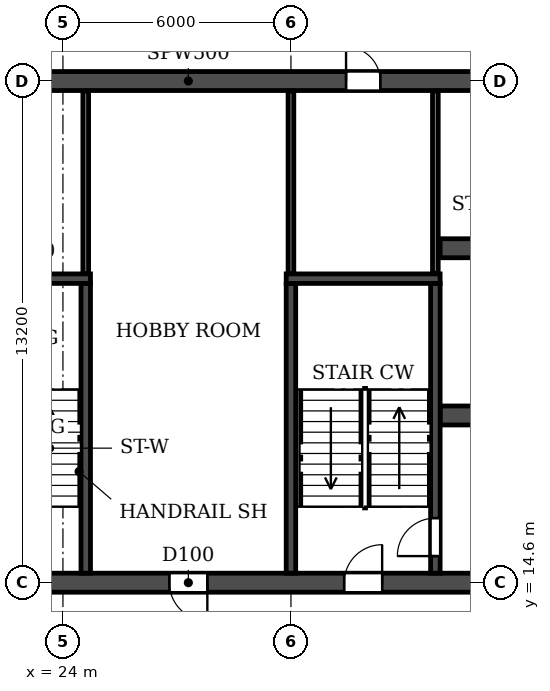
"""IFC4 building model, lengths in metres.
Left out: names, types, materials, properties, quantities, classifications, styles, units other than length and angle.
Written with IfcOpenShell. Run it as: python <this file> out.ifc"""

import sys

from ifc_helpers import new_model, si_unit, direction, frame, frame_2d, origin, place, context, subcontext, project, spatial, rectangle, extrude, element, fill, save


model = new_model("IFC4")
c1 = context("Model", 3, precision=1e-05, world=origin(), true_north=direction((0.0, 1.0)))
c2 = subcontext(c1, "Body", "Model", "MODEL_VIEW")
j1 = project(units=[si_unit("LENGTHUNIT", "METRE"), si_unit("PLANEANGLEUNIT", "RADIAN")], contexts=[c1])
p1 = place(None, origin())
s1 = spatial("IfcSite", under=j1, at=p1, CompositionType="ELEMENT")
p2 = place(p1, origin())
s2 = spatial("IfcBuilding", under=s1, at=p2, CompositionType="ELEMENT")
p3 = place(p2, frame((0.0, 0.0, 102.6)))
s3 = spatial("IfcBuildingStorey", under=s2, at=p3, CompositionType="ELEMENT", Elevation=102.6)
p4 = place(p3, frame((8.6, 14.6, 0.0), z_axis=(0.0, 0.0, 1.0), x_axis=(1.0, 0.0, 0.0)))
e1 = element("IfcWall", 1, at=p4, inside=s3, PredefinedType="SOLIDWALL", context=c2, shape_type="SweptSolid", body=[
    extrude(rectangle(XDim=84.8, YDim=0.5, at=frame_2d((42.4, 0.0))), origin(), (0.0, 0.0, 1.0), 3.0),
])
p5 = place(p4, frame((0.9, 0.0, 0.0)))
e2 = element("IfcOpeningElement", 2, at=p5, cuts=e1, PredefinedType="OPENING", context=c2, shape_type="SweptSolid", body=[
    extrude(rectangle(XDim=1.0, YDim=2.1, at=frame_2d((0.5, 1.05))), frame((0.0, 0.26, 0.0), z_axis=(0.0, -1.0, 0.0), x_axis=(1.0, 0.0, 0.0)), (0.0, 0.0, 1.0), 0.52),
])
p6 = place(p4, frame((5.6, 0.0, 0.0)))
e3 = element("IfcOpeningElement", 3, at=p6, cuts=e1, PredefinedType="OPENING", context=c2, shape_type="SweptSolid", body=[
    extrude(rectangle(XDim=1.0, YDim=2.1, at=frame_2d((0.5, 1.05))), frame((0.0, 0.26, 0.0), z_axis=(0.0, -1.0, 0.0), x_axis=(1.0, 0.0, 0.0)), (0.0, 0.0, 1.0), 0.52),
])
p7 = place(p4, frame((10.3, 0.0, 0.0)))
e4 = element("IfcOpeningElement", 4, at=p7, cuts=e1, PredefinedType="OPENING", context=c2, shape_type="SweptSolid", body=[
    extrude(rectangle(XDim=1.0, YDim=2.1, at=frame_2d((0.5, 1.05))), frame((0.0, 0.26, 0.0), z_axis=(0.0, -1.0, 0.0), x_axis=(1.0, 0.0, 0.0)), (0.0, 0.0, 1.0), 0.52),
])
p8 = place(p4, frame((18.2, 0.0, 0.0)))
e5 = element("IfcOpeningElement", 5, at=p8, cuts=e1, PredefinedType="OPENING", context=c2, shape_type="SweptSolid", body=[
    extrude(rectangle(XDim=1.0, YDim=2.1, at=frame_2d((0.5, 1.05))), frame((0.0, 0.26, 0.0), z_axis=(0.0, -1.0, 0.0), x_axis=(1.0, 0.0, 0.0)), (0.0, 0.0, 1.0), 0.52),
])
p9 = place(p4, frame((22.8, 0.0, 0.0)))
e6 = element("IfcOpeningElement", 6, at=p9, cuts=e1, PredefinedType="OPENING", context=c2, shape_type="SweptSolid", body=[
    extrude(rectangle(XDim=1.0, YDim=2.1, at=frame_2d((0.5, 1.05))), frame((0.0, 0.26, 0.0), z_axis=(0.0, -1.0, 0.0), x_axis=(1.0, 0.0, 0.0)), (0.0, 0.0, 1.0), 0.52),
])
p10 = place(p4, frame((36.7, 0.0, 0.0)))
e7 = element("IfcOpeningElement", 7, at=p10, cuts=e1, PredefinedType="OPENING", context=c2, shape_type="SweptSolid", body=[
    extrude(rectangle(XDim=1.0, YDim=2.1, at=frame_2d((0.5, 1.05))), frame((0.0, 0.26, 0.0), z_axis=(0.0, -1.0, 0.0), x_axis=(1.0, 0.0, 0.0)), (0.0, 0.0, 1.0), 0.52),
])
p11 = place(p4, frame((41.9, 0.0, 0.0)))
e8 = element("IfcOpeningElement", 8, at=p11, cuts=e1, PredefinedType="OPENING", context=c2, shape_type="SweptSolid", body=[
    extrude(rectangle(XDim=1.0, YDim=2.1, at=frame_2d((0.5, 1.05))), frame((0.0, 0.26, 0.0), z_axis=(0.0, -1.0, 0.0), x_axis=(1.0, 0.0, 0.0)), (0.0, 0.0, 1.0), 0.52),
])
p12 = place(p4, frame((47.1, 0.0, 0.0)))
e9 = element("IfcOpeningElement", 9, at=p12, cuts=e1, PredefinedType="OPENING", context=c2, shape_type="SweptSolid", body=[
    extrude(rectangle(XDim=1.0, YDim=2.1, at=frame_2d((0.5, 1.05))), frame((0.0, 0.26, 0.0), z_axis=(0.0, -1.0, 0.0), x_axis=(1.0, 0.0, 0.0)), (0.0, 0.0, 1.0), 0.52),
])
p13 = place(p4, frame((61.0, 0.0, 0.0)))
e10 = element("IfcOpeningElement", 10, at=p13, cuts=e1, PredefinedType="OPENING", context=c2, shape_type="SweptSolid", body=[
    extrude(rectangle(XDim=1.0, YDim=2.1, at=frame_2d((0.5, 1.05))), frame((0.0, 0.26, 0.0), z_axis=(0.0, -1.0, 0.0), x_axis=(1.0, 0.0, 0.0)), (0.0, 0.0, 1.0), 0.52),
])
p14 = place(p4, frame((65.6, 0.0, 0.0)))
e11 = element("IfcOpeningElement", 11, at=p14, cuts=e1, PredefinedType="OPENING", context=c2, shape_type="SweptSolid", body=[
    extrude(rectangle(XDim=1.0, YDim=2.1, at=frame_2d((0.5, 1.05))), frame((0.0, 0.26, 0.0), z_axis=(0.0, -1.0, 0.0), x_axis=(1.0, 0.0, 0.0)), (0.0, 0.0, 1.0), 0.52),
])
p15 = place(p4, frame((73.5, 0.0, 0.0)))
e12 = element("IfcOpeningElement", 12, at=p15, cuts=e1, PredefinedType="OPENING", context=c2, shape_type="SweptSolid", body=[
    extrude(rectangle(XDim=1.0, YDim=2.1, at=frame_2d((0.5, 1.05))), frame((0.0, 0.26, 0.0), z_axis=(0.0, -1.0, 0.0), x_axis=(1.0, 0.0, 0.0)), (0.0, 0.0, 1.0), 0.52),
])
p16 = place(p4, frame((79.6, 0.0, 0.0)))
e13 = element("IfcOpeningElement", 13, at=p16, cuts=e1, PredefinedType="OPENING", context=c2, shape_type="SweptSolid", body=[
    extrude(rectangle(XDim=1.0, YDim=2.1, at=frame_2d((0.5, 1.05))), frame((0.0, 0.26, 0.0), z_axis=(0.0, -1.0, 0.0), x_axis=(1.0, 0.0, 0.0)), (0.0, 0.0, 1.0), 0.52),
])
p17 = place(p3, frame((8.6, 27.8, 0.0), z_axis=(0.0, 0.0, 1.0), x_axis=(1.0, 0.0, 0.0)))
e14 = element("IfcWall", 14, at=p17, inside=s3, PredefinedType="SOLIDWALL", context=c2, shape_type="SweptSolid", body=[
    extrude(rectangle(XDim=84.8, YDim=0.5, at=frame_2d((42.4, 0.0))), origin(), (0.0, 0.0, 1.0), 3.0),
])
p18 = place(p17, frame((1.35, 0.0, 0.0)))
e15 = element("IfcOpeningElement", 15, at=p18, cuts=e14, PredefinedType="OPENING", context=c2, shape_type="SweptSolid", body=[
    extrude(rectangle(XDim=1.0, YDim=2.1, at=frame_2d((0.5, 1.05))), frame((0.0, 0.26, 0.0), z_axis=(0.0, -1.0, 0.0), x_axis=(1.0, 0.0, 0.0)), (0.0, 0.0, 1.0), 0.52),
])
p19 = place(p17, frame((6.05, 0.0, 0.0)))
e16 = element("IfcOpeningElement", 16, at=p19, cuts=e14, PredefinedType="OPENING", context=c2, shape_type="SweptSolid", body=[
    extrude(rectangle(XDim=1.0, YDim=2.1, at=frame_2d((0.5, 1.05))), frame((0.0, 0.26, 0.0), z_axis=(0.0, -1.0, 0.0), x_axis=(1.0, 0.0, 0.0)), (0.0, 0.0, 1.0), 0.52),
])
p20 = place(p17, frame((10.3, 0.0, 0.0)))
e17 = element("IfcOpeningElement", 17, at=p20, cuts=e14, PredefinedType="OPENING", context=c2, shape_type="SweptSolid", body=[
    extrude(rectangle(XDim=1.0, YDim=2.1, at=frame_2d((0.5, 1.05))), frame((0.0, 0.26, 0.0), z_axis=(0.0, -1.0, 0.0), x_axis=(1.0, 0.0, 0.0)), (0.0, 0.0, 1.0), 0.52),
])
p21 = place(p17, frame((13.65, 0.0, 0.0)))
e18 = element("IfcOpeningElement", 18, at=p21, cuts=e14, PredefinedType="OPENING", context=c2, shape_type="SweptSolid", body=[
    extrude(rectangle(XDim=0.9, YDim=2.1, at=frame_2d((0.45, 1.05))), frame((0.0, 0.26, 0.0), z_axis=(0.0, -1.0, 0.0), x_axis=(1.0, 0.0, 0.0)), (0.0, 0.0, 1.0), 0.52),
])
p22 = place(p17, frame((22.85, 0.0, 0.0)))
e19 = element("IfcOpeningElement", 19, at=p22, cuts=e14, PredefinedType="OPENING", context=c2, shape_type="SweptSolid", body=[
    extrude(rectangle(XDim=0.9, YDim=2.1, at=frame_2d((0.45, 1.05))), frame((0.0, 0.26, 0.0), z_axis=(0.0, -1.0, 0.0), x_axis=(1.0, 0.0, 0.0)), (0.0, 0.0, 1.0), 0.52),
])
p23 = place(p17, frame((28.6, 0.0, 0.0)))
e20 = element("IfcOpeningElement", 20, at=p23, cuts=e14, PredefinedType="OPENING", context=c2, shape_type="SweptSolid", body=[
    extrude(rectangle(XDim=1.0, YDim=2.1, at=frame_2d((0.5, 1.05))), frame((0.0, 0.26, 0.0), z_axis=(0.0, -1.0, 0.0), x_axis=(1.0, 0.0, 0.0)), (0.0, 0.0, 1.0), 0.52),
])
p24 = place(p17, frame((33.8, 0.0, 0.0)))
e21 = element("IfcOpeningElement", 21, at=p24, cuts=e14, PredefinedType="OPENING", context=c2, shape_type="SweptSolid", body=[
    extrude(rectangle(XDim=1.0, YDim=2.1, at=frame_2d((0.5, 1.05))), frame((0.0, 0.26, 0.0), z_axis=(0.0, -1.0, 0.0), x_axis=(1.0, 0.0, 0.0)), (0.0, 0.0, 1.0), 0.52),
])
p25 = place(p17, frame((39.0, 0.0, 0.0)))
e22 = element("IfcOpeningElement", 22, at=p25, cuts=e14, PredefinedType="OPENING", context=c2, shape_type="SweptSolid", body=[
    extrude(rectangle(XDim=1.0, YDim=2.1, at=frame_2d((0.5, 1.05))), frame((0.0, 0.26, 0.0), z_axis=(0.0, -1.0, 0.0), x_axis=(1.0, 0.0, 0.0)), (0.0, 0.0, 1.0), 0.52),
])
p26 = place(p17, frame((41.9, 0.0, 0.0)))
e23 = element("IfcOpeningElement", 23, at=p26, cuts=e14, PredefinedType="OPENING", context=c2, shape_type="SweptSolid", body=[
    extrude(rectangle(XDim=1.0, YDim=2.1, at=frame_2d((0.5, 1.05))), frame((0.0, 0.26, 0.0), z_axis=(0.0, -1.0, 0.0), x_axis=(1.0, 0.0, 0.0)), (0.0, 0.0, 1.0), 0.52),
])
p27 = place(p17, frame((44.8, 0.0, 0.0)))
e24 = element("IfcOpeningElement", 24, at=p27, cuts=e14, PredefinedType="OPENING", context=c2, shape_type="SweptSolid", body=[
    extrude(rectangle(XDim=1.0, YDim=2.1, at=frame_2d((0.5, 1.05))), frame((0.0, 0.26, 0.0), z_axis=(0.0, -1.0, 0.0), x_axis=(1.0, 0.0, 0.0)), (0.0, 0.0, 1.0), 0.52),
])
p28 = place(p17, frame((48.7, 0.0, 0.0)))
e25 = element("IfcOpeningElement", 25, at=p28, cuts=e14, PredefinedType="OPENING", context=c2, shape_type="SweptSolid", body=[
    extrude(rectangle(XDim=1.0, YDim=2.1, at=frame_2d((0.5, 1.05))), frame((0.0, 0.26, 0.0), z_axis=(0.0, -1.0, 0.0), x_axis=(1.0, 0.0, 0.0)), (0.0, 0.0, 1.0), 0.52),
])
p29 = place(p17, frame((55.2, 0.0, 0.0)))
e26 = element("IfcOpeningElement", 26, at=p29, cuts=e14, PredefinedType="OPENING", context=c2, shape_type="SweptSolid", body=[
    extrude(rectangle(XDim=1.0, YDim=2.1, at=frame_2d((0.5, 1.05))), frame((0.0, 0.26, 0.0), z_axis=(0.0, -1.0, 0.0), x_axis=(1.0, 0.0, 0.0)), (0.0, 0.0, 1.0), 0.52),
])
p30 = place(p17, frame((61.05, 0.0, 0.0)))
e27 = element("IfcOpeningElement", 27, at=p30, cuts=e14, PredefinedType="OPENING", context=c2, shape_type="SweptSolid", body=[
    extrude(rectangle(XDim=0.9, YDim=2.1, at=frame_2d((0.45, 1.05))), frame((0.0, 0.26, 0.0), z_axis=(0.0, -1.0, 0.0), x_axis=(1.0, 0.0, 0.0)), (0.0, 0.0, 1.0), 0.52),
])
p31 = place(p17, frame((70.25, 0.0, 0.0)))
e28 = element("IfcOpeningElement", 28, at=p31, cuts=e14, PredefinedType="OPENING", context=c2, shape_type="SweptSolid", body=[
    extrude(rectangle(XDim=0.9, YDim=2.1, at=frame_2d((0.45, 1.05))), frame((0.0, 0.26, 0.0), z_axis=(0.0, -1.0, 0.0), x_axis=(1.0, 0.0, 0.0)), (0.0, 0.0, 1.0), 0.52),
])
p32 = place(p17, frame((73.5, 0.0, 0.0)))
e29 = element("IfcOpeningElement", 29, at=p32, cuts=e14, PredefinedType="OPENING", context=c2, shape_type="SweptSolid", body=[
    extrude(rectangle(XDim=1.0, YDim=2.1, at=frame_2d((0.5, 1.05))), frame((0.0, 0.26, 0.0), z_axis=(0.0, -1.0, 0.0), x_axis=(1.0, 0.0, 0.0)), (0.0, 0.0, 1.0), 0.52),
])
p33 = place(p17, frame((77.95, 0.0, 0.0)))
e30 = element("IfcOpeningElement", 30, at=p33, cuts=e14, PredefinedType="OPENING", context=c2, shape_type="SweptSolid", body=[
    extrude(rectangle(XDim=1.5, YDim=2.1, at=frame_2d((0.75, 1.05))), frame((0.0, 0.26, 0.0), z_axis=(0.0, -1.0, 0.0), x_axis=(1.0, 0.0, 0.0)), (0.0, 0.0, 1.0), 0.52),
])
p34 = place(p17, frame((82.9, 0.0, 0.0)))
e31 = element("IfcOpeningElement", 31, at=p34, cuts=e14, PredefinedType="OPENING", context=c2, shape_type="SweptSolid", body=[
    extrude(rectangle(XDim=1.0, YDim=2.1, at=frame_2d((0.5, 1.05))), frame((0.0, 0.26, 0.0), z_axis=(0.0, -1.0, 0.0), x_axis=(1.0, 0.0, 0.0)), (0.0, 0.0, 1.0), 0.52),
])
p35 = place(p3, frame((33.925, 19.0, 0.0), z_axis=(0.0, 0.0, 1.0), x_axis=(1.0, 0.0, 0.0)))
e32 = element("IfcWall", 32, at=p35, inside=s3, PredefinedType="SOLIDWALL", context=c2, shape_type="SweptSolid", body=[
    extrude(rectangle(XDim=34.15, YDim=0.5, at=frame_2d((17.075, 0.0))), origin(), (0.0, 0.0, 1.0), 3.0),
])
p36 = place(p35, frame((16.175, 0.0, 0.0)))
e33 = element("IfcOpeningElement", 33, at=p36, cuts=e32, PredefinedType="OPENING", context=c2, shape_type="SweptSolid", body=[
    extrude(rectangle(XDim=1.8, YDim=2.1, at=frame_2d((0.9, 1.05))), frame((0.0, 0.26, 0.0), z_axis=(0.0, -1.0, 0.0), x_axis=(1.0, 0.0, 0.0)), (0.0, 0.0, 1.0), 0.52),
])
p37 = place(p35, frame((1.525, 0.0, 0.0)))
e34 = element("IfcOpeningElement", 34, at=p37, cuts=e32, PredefinedType="OPENING", context=c2, shape_type="SweptSolid", body=[
    extrude(rectangle(XDim=1.8, YDim=2.1, at=frame_2d((0.9, 1.05))), frame((0.0, 0.26, 0.0), z_axis=(0.0, -1.0, 0.0), x_axis=(1.0, 0.0, 0.0)), (0.0, 0.0, 1.0), 0.52),
])
p38 = place(p35, frame((8.725, 0.0, 0.0)))
e35 = element("IfcOpeningElement", 35, at=p38, cuts=e32, PredefinedType="OPENING", context=c2, shape_type="SweptSolid", body=[
    extrude(rectangle(XDim=1.1, YDim=2.1, at=frame_2d((0.55, 1.05))), frame((0.0, 0.26, 0.0), z_axis=(0.0, -1.0, 0.0), x_axis=(1.0, 0.0, 0.0)), (0.0, 0.0, 1.0), 0.52),
])
p39 = place(p35, frame((11.325, 0.0, 0.0)))
e36 = element("IfcOpeningElement", 36, at=p39, cuts=e32, PredefinedType="OPENING", context=c2, shape_type="SweptSolid", body=[
    extrude(rectangle(XDim=1.1, YDim=2.1, at=frame_2d((0.55, 1.05))), frame((0.0, 0.26, 0.0), z_axis=(0.0, -1.0, 0.0), x_axis=(1.0, 0.0, 0.0)), (0.0, 0.0, 1.0), 0.52),
])
p40 = place(p35, frame((13.925, 0.0, 0.0)))
e37 = element("IfcOpeningElement", 37, at=p40, cuts=e32, PredefinedType="OPENING", context=c2, shape_type="SweptSolid", body=[
    extrude(rectangle(XDim=1.1, YDim=2.1, at=frame_2d((0.55, 1.05))), frame((0.0, 0.26, 0.0), z_axis=(0.0, -1.0, 0.0), x_axis=(1.0, 0.0, 0.0)), (0.0, 0.0, 1.0), 0.52),
])
p41 = place(p35, frame((19.125, 0.0, 0.0)))
e38 = element("IfcOpeningElement", 38, at=p41, cuts=e32, PredefinedType="OPENING", context=c2, shape_type="SweptSolid", body=[
    extrude(rectangle(XDim=1.1, YDim=2.1, at=frame_2d((0.55, 1.05))), frame((0.0, 0.26, 0.0), z_axis=(0.0, -1.0, 0.0), x_axis=(1.0, 0.0, 0.0)), (0.0, 0.0, 1.0), 0.52),
])
p42 = place(p35, frame((21.725, 0.0, 0.0)))
e39 = element("IfcOpeningElement", 39, at=p42, cuts=e32, PredefinedType="OPENING", context=c2, shape_type="SweptSolid", body=[
    extrude(rectangle(XDim=1.1, YDim=2.1, at=frame_2d((0.55, 1.05))), frame((0.0, 0.26, 0.0), z_axis=(0.0, -1.0, 0.0), x_axis=(1.0, 0.0, 0.0)), (0.0, 0.0, 1.0), 0.52),
])
p43 = place(p35, frame((24.325, 0.0, 0.0)))
e40 = element("IfcOpeningElement", 40, at=p43, cuts=e32, PredefinedType="OPENING", context=c2, shape_type="SweptSolid", body=[
    extrude(rectangle(XDim=1.1, YDim=2.1, at=frame_2d((0.55, 1.05))), frame((0.0, 0.26, 0.0), z_axis=(0.0, -1.0, 0.0), x_axis=(1.0, 0.0, 0.0)), (0.0, 0.0, 1.0), 0.52),
])
p44 = place(p35, frame((30.825, 0.0, 0.0)))
e41 = element("IfcOpeningElement", 41, at=p44, cuts=e32, PredefinedType="OPENING", context=c2, shape_type="SweptSolid", body=[
    extrude(rectangle(XDim=1.8, YDim=2.1, at=frame_2d((0.9, 1.05))), frame((0.0, 0.26, 0.0), z_axis=(0.0, -1.0, 0.0), x_axis=(1.0, 0.0, 0.0)), (0.0, 0.0, 1.0), 0.52),
])
p45 = place(p3, frame((33.925, 23.4, 0.0), z_axis=(0.0, 0.0, 1.0), x_axis=(1.0, 0.0, 0.0)))
e42 = element("IfcWall", 42, at=p45, inside=s3, PredefinedType="SOLIDWALL", context=c2, shape_type="SweptSolid", body=[
    extrude(rectangle(XDim=34.15, YDim=0.5, at=frame_2d((17.075, 0.0))), origin(), (0.0, 0.0, 1.0), 3.0),
])
p46 = place(p45, frame((16.175, 0.0, 0.0)))
e43 = element("IfcOpeningElement", 43, at=p46, cuts=e42, PredefinedType="OPENING", context=c2, shape_type="SweptSolid", body=[
    extrude(rectangle(XDim=1.8, YDim=2.1, at=frame_2d((0.9, 1.05))), frame((0.0, 0.26, 0.0), z_axis=(0.0, -1.0, 0.0), x_axis=(1.0, 0.0, 0.0)), (0.0, 0.0, 1.0), 0.52),
])
p47 = place(p45, frame((11.025, 0.0, 0.0)))
e44 = element("IfcOpeningElement", 44, at=p47, cuts=e42, PredefinedType="OPENING", context=c2, shape_type="SweptSolid", body=[
    extrude(rectangle(XDim=1.1, YDim=2.1, at=frame_2d((0.55, 1.05))), frame((0.0, 0.26, 0.0), z_axis=(0.0, -1.0, 0.0), x_axis=(1.0, 0.0, 0.0)), (0.0, 0.0, 1.0), 0.52),
])
p48 = place(p3, frame((30.0, 14.85, 0.0), z_axis=(0.0, 0.0, 1.0), x_axis=(0.0, 1.0, 0.0)))
e45 = element("IfcWall", 45, at=p48, inside=s3, PredefinedType="SOLIDWALL", context=c2, shape_type="SweptSolid", body=[
    extrude(rectangle(XDim=7.625, YDim=0.25, at=frame_2d((3.812, 0.0))), origin(), (0.0, 0.0, 1.0), 3.0),
])
p49 = place(p3, frame((33.8, 14.85, 0.0), z_axis=(0.0, 0.0, 1.0), x_axis=(0.0, 1.0, 0.0)))
e46 = element("IfcWall", 46, at=p49, inside=s3, PredefinedType="SOLIDWALL", context=c2, shape_type="SweptSolid", body=[
    extrude(rectangle(XDim=7.625, YDim=0.25, at=frame_2d((3.812, 0.0))), origin(), (0.0, 0.0, 1.0), 3.0),
])
p50 = place(p49, frame((0.45, 0.0, 0.0)))
e47 = element("IfcOpeningElement", 47, at=p50, cuts=e46, PredefinedType="OPENING", context=c2, shape_type="SweptSolid", body=[
    extrude(rectangle(XDim=1.0, YDim=2.1, at=frame_2d((0.5, 1.05))), frame((0.0, 0.135, 0.0), z_axis=(0.0, -1.0, 0.0), x_axis=(1.0, 0.0, 0.0)), (0.0, 0.0, 1.0), 0.27),
])
p51 = place(p3, frame((29.875, 22.6, 0.0), z_axis=(0.0, 0.0, 1.0), x_axis=(1.0, 0.0, 0.0)))
e48 = element("IfcWall", 48, at=p51, inside=s3, PredefinedType="SOLIDWALL", context=c2, shape_type="SweptSolid", body=[
    extrude(rectangle(XDim=4.05, YDim=0.25, at=frame_2d((2.025, 0.0))), origin(), (0.0, 0.0, 1.0), 3.0),
])
p52 = place(p3, frame((24.6, 14.85, 0.0), z_axis=(0.0, 0.0, 1.0), x_axis=(0.0, 1.0, 0.0)))
e49 = element("IfcWall", 49, at=p52, inside=s3, PredefinedType="SOLIDWALL", context=c2, shape_type="SweptSolid", body=[
    extrude(rectangle(XDim=7.625, YDim=0.25, at=frame_2d((3.812, 0.0))), origin(), (0.0, 0.0, 1.0), 3.0),
])
p53 = place(p3, frame((20.675, 22.6, 0.0), z_axis=(0.0, 0.0, 1.0), x_axis=(1.0, 0.0, 0.0)))
e50 = element("IfcWall", 50, at=p53, inside=s3, PredefinedType="SOLIDWALL", context=c2, shape_type="SweptSolid", body=[
    extrude(rectangle(XDim=4.05, YDim=0.25, at=frame_2d((2.025, 0.0))), origin(), (0.0, 0.0, 1.0), 3.0),
])
for number, where, z_axis, x_axis in (
    (51, (24.6, 22.735, 0.0), (0.0, 0.0, 1.0), (0.0, 1.0, 0.0)),
    (52, (30.0, 22.735, 0.0), (0.0, 0.0, 1.0), (0.0, 1.0, 0.0)),
    (53, (33.8, 22.735, 0.0), (0.0, 0.0, 1.0), (0.0, 1.0, 0.0)),
):
    element("IfcWall", number, at=place(p3, frame(where, z_axis=z_axis, x_axis=x_axis)), inside=s3, PredefinedType="PARTITIONING", context=c2, shape_type="SweptSolid", body=[
        extrude(rectangle(XDim=4.805, YDim=0.15, at=frame_2d((2.402, 0.0))), origin(), (0.0, 0.0, 1.0), 3.0),
    ])
p54 = place(p22, origin())
e54 = element("IfcDoor", 54, at=p54, inside=s3, OperationType="SINGLE_SWING_LEFT", PredefinedType="DOOR", context=c2, shape_type="SweptSolid", body=[
    extrude(rectangle(XDim=0.9, YDim=2.1, at=frame_2d((0.45, 1.05))), frame((0.0, 0.025, 0.0), z_axis=(0.0, -1.0, 0.0), x_axis=(1.0, 0.0, 0.0)), (0.0, 0.0, 1.0), 0.05),
])
fill(e19, e54)
p55 = place(p8, frame((1.0, 0.0, 0.0), z_axis=(0.0, 0.0, 1.0), x_axis=(-1.0, 0.0, 0.0)))
e55 = element("IfcDoor", 55, at=p55, inside=s3, OperationType="SINGLE_SWING_LEFT", PredefinedType="DOOR", context=c2, shape_type="SweptSolid", body=[
    extrude(rectangle(XDim=1.0, YDim=2.1, at=frame_2d((0.5, 1.05))), frame((0.0, 0.025, 0.0), z_axis=(0.0, -1.0, 0.0), x_axis=(1.0, 0.0, 0.0)), (0.0, 0.0, 1.0), 0.05),
])
fill(e5, e55)
p56 = place(p9, origin())
e56 = element("IfcDoor", 56, at=p56, inside=s3, OperationType="SINGLE_SWING_RIGHT", PredefinedType="DOOR", context=c2, shape_type="SweptSolid", body=[
    extrude(rectangle(XDim=1.0, YDim=2.1, at=frame_2d((0.5, 1.05))), frame((0.0, 0.025, 0.0), z_axis=(0.0, -1.0, 0.0), x_axis=(1.0, 0.0, 0.0)), (0.0, 0.0, 1.0), 0.05),
])
fill(e6, e56)
p57 = place(p50, origin())
e57 = element("IfcDoor", 57, at=p57, inside=s3, OperationType="SINGLE_SWING_LEFT", PredefinedType="DOOR", context=c2, shape_type="SweptSolid", body=[
    extrude(rectangle(XDim=1.0, YDim=2.1, at=frame_2d((0.5, 1.05))), frame((0.0, 0.025, 0.0), z_axis=(0.0, -1.0, 0.0), x_axis=(1.0, 0.0, 0.0)), (0.0, 0.0, 1.0), 0.05),
])
fill(e47, e57)
save(model, sys.argv[1])
